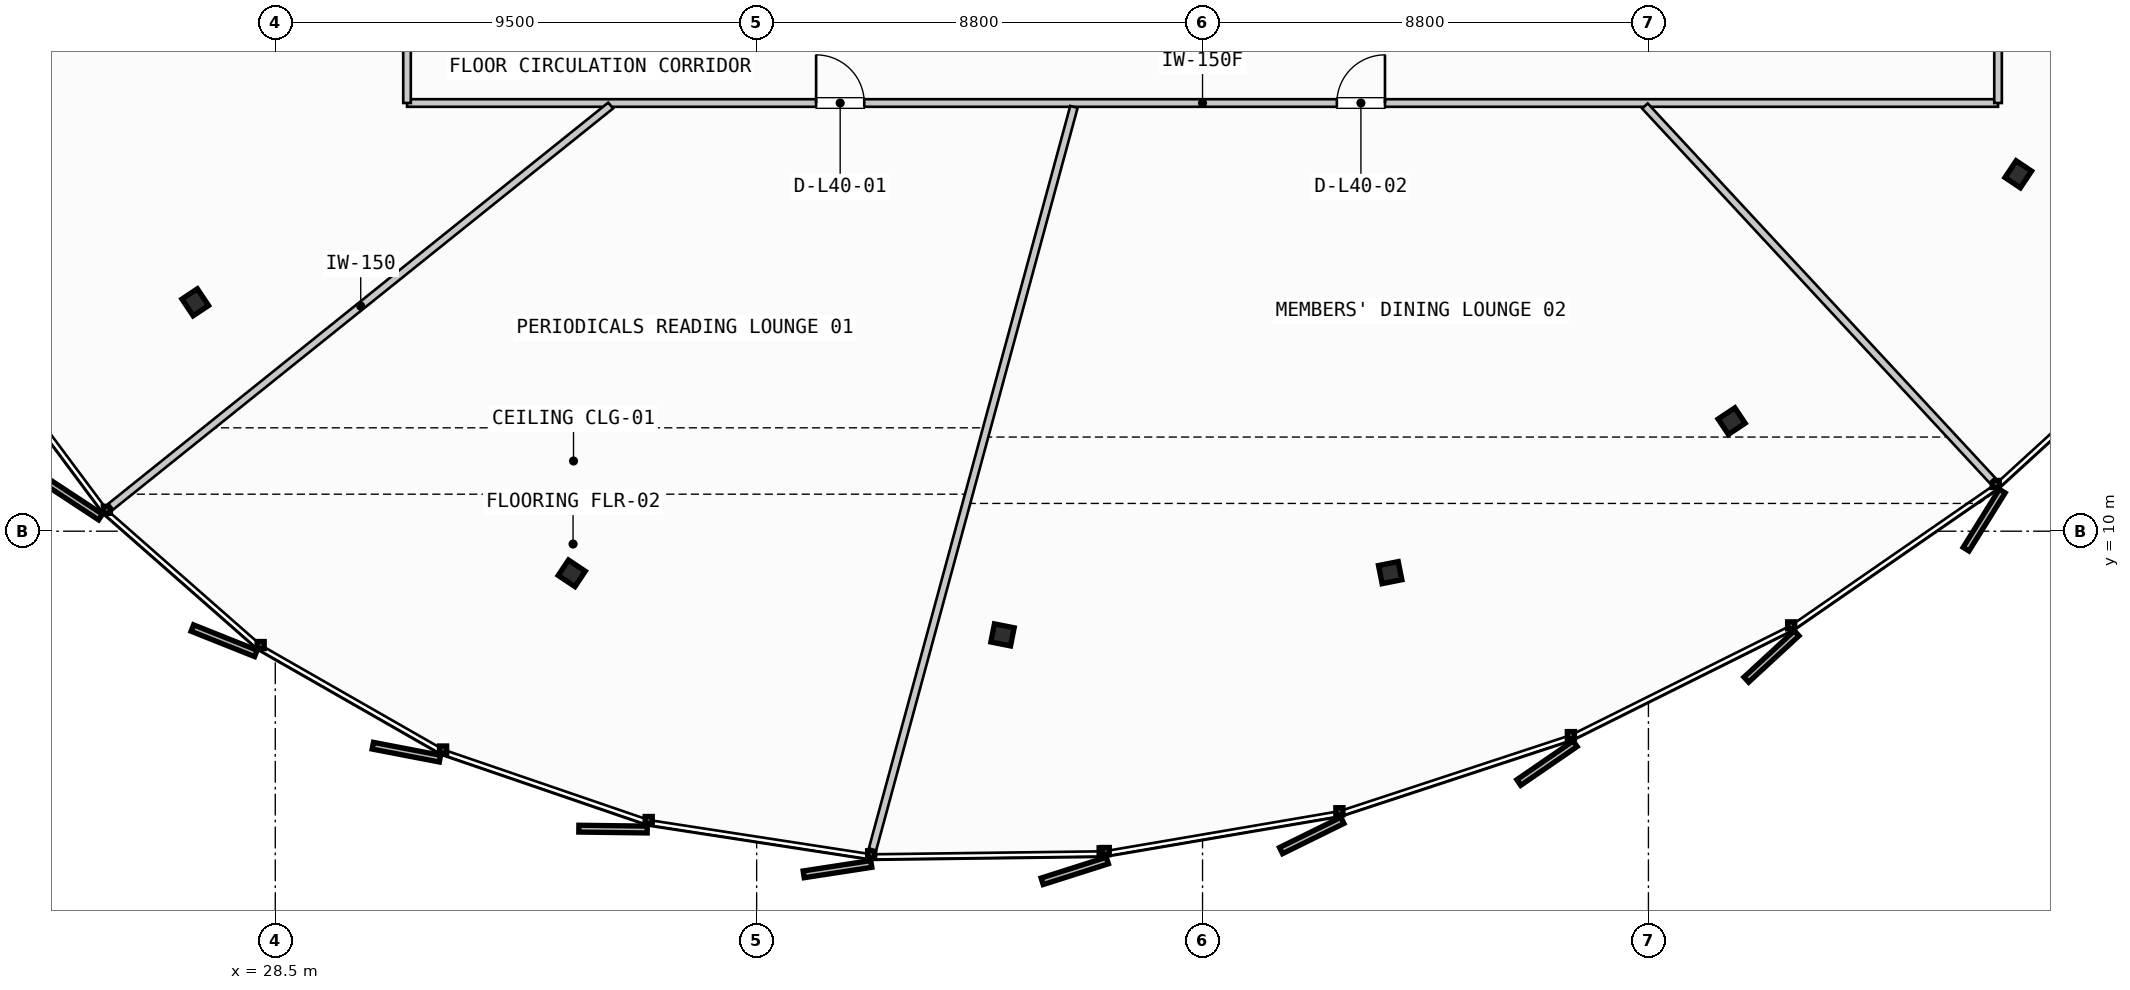
"""IFC4 building model, lengths in metres.
Left out: names, types, materials, properties, quantities, classifications, styles, units other than length and angle.
Written with IfcOpenShell. Run it as: python <this file> out.ifc"""

import sys

from ifc_helpers import new_model, si_unit, direction, frame, frame_2d, origin, origin_2d, place, context, subcontext, project, spatial, rectangle, i_section, extrude, source, transform, mapped, element, fill, save


model = new_model("IFC4")
c1 = context("Model", 3, precision=1e-05, world=origin(), true_north=direction((0.0, 1.0)))
c2 = subcontext(c1, "Body", "Model", "MODEL_VIEW")
j1 = project(units=[si_unit("LENGTHUNIT", "METRE"), si_unit("PLANEANGLEUNIT", "RADIAN")], contexts=[c1])
p1 = place(None, origin())
s1 = spatial("IfcSite", under=j1, at=p1, CompositionType="ELEMENT")
p2 = place(p1, origin())
s2 = spatial("IfcBuilding", under=s1, at=p2, CompositionType="ELEMENT")
p3 = place(p2, frame((0.0, 0.0, 157.2)))
s3 = spatial("IfcBuildingStorey", under=s2, at=p3, CompositionType="ELEMENT", Elevation=157.2)
m1 = source(origin(), c2, "Body", "SweptSolid", [
    extrude(i_section(OverallWidth=0.397, OverallDepth=0.365, WebThickness=0.028, FlangeThickness=0.044, FilletRadius=0.015, at=origin_2d()), origin(), (0.0, 0.0, 1.0), 3.3),
])
for number, where, z_axis, x_axis in (
    (1, (26.921, 14.517, 0.0), (0.0, 0.0, 1.0), (-0.831, -0.556, 0.0)),
    (2, (34.351, 9.168, 0.0), (0.0, 0.0, 1.0), (-0.556, -0.831, 0.0)),
    (3, (42.852, 7.954, 0.0), (0.0, 0.0, 1.0), (-0.195, -0.981, 0.0)),
    (4, (50.503, 9.182, 0.0), (0.0, 0.0, 1.0), (0.195, -0.981, 0.0)),
    (5, (57.242, 12.172, 0.0), (0.0, 0.0, 1.0), (0.556, -0.831, 0.0)),
    (6, (62.899, 17.043, 0.0), (0.0, 0.0, 1.0), (0.831, -0.556, 0.0)),
):
    element("IfcColumn", number, at=place(p3, frame(where, z_axis=z_axis, x_axis=x_axis)), inside=s3, PredefinedType="COLUMN", context=c2, shape_type="MappedRepresentation", body=[
        mapped(m1, transform((0.0, 0.0, 0.0), scale=1.0)),
    ])
p4 = place(p3, frame((31.1, 18.45, 0.0), z_axis=(0.0, 0.0, 1.0), x_axis=(1.0, 0.0, 0.0)))
e7 = element("IfcWall", 7, at=p4, inside=s3, PredefinedType="PARTITIONING", context=c2, shape_type="SweptSolid", body=[
    extrude(rectangle(XDim=31.4, YDim=0.15, at=frame_2d((15.7, 0.0))), origin(), (0.0, 0.0, 1.0), 2.28),
])
p5 = place(p4, frame((8.074, 0.0, 0.0)))
e8 = element("IfcOpeningElement", 8, at=p5, cuts=e7, PredefinedType="OPENING", context=c2, shape_type="SweptSolid", body=[
    extrude(rectangle(XDim=0.95, YDim=2.15, at=frame_2d((0.475, 1.075))), frame((0.0, 0.085, 0.0), z_axis=(0.0, -1.0, 0.0), x_axis=(1.0, 0.0, 0.0)), (0.0, 0.0, 1.0), 0.17),
])
p6 = place(p4, frame((18.351, 0.0, 0.0)))
e9 = element("IfcOpeningElement", 9, at=p6, cuts=e7, PredefinedType="OPENING", context=c2, shape_type="SweptSolid", body=[
    extrude(rectangle(XDim=0.95, YDim=2.15, at=frame_2d((0.475, 1.075))), frame((0.0, 0.085, 0.0), z_axis=(0.0, -1.0, 0.0), x_axis=(1.0, 0.0, 0.0)), (0.0, 0.0, 1.0), 0.17),
])
for number, where, z_axis, x_axis in (
    (10, (62.5, 18.45, 0.0), (0.0, 0.0, 1.0), (0.0, 1.0, 0.0)),
    (11, (31.1, 20.15, 0.0), (0.0, 0.0, 1.0), (0.0, -1.0, 0.0)),
):
    element("IfcWall", number, at=place(p3, frame(where, z_axis=z_axis, x_axis=x_axis)), inside=s3, PredefinedType="PARTITIONING", context=c2, shape_type="SweptSolid", body=[
        extrude(rectangle(XDim=1.7, YDim=0.15, at=frame_2d((0.85, 0.0))), origin(), (0.0, 0.0, 1.0), 2.28),
    ])
p7 = place(p3, frame((35.119, 18.4, 0.0), z_axis=(0.0, 0.0, 1.0), x_axis=(-0.779988558274, -0.625793775106, 0.0)))
e12 = element("IfcWall", 12, at=p7, inside=s3, PredefinedType="PARTITIONING", context=c2, shape_type="SweptSolid", body=[
    extrude(rectangle(XDim=12.648, YDim=0.15, at=frame_2d((6.324, 0.0))), origin(), (0.0, 0.0, 1.0), 2.28),
])
p8 = place(p3, frame((44.262, 18.373, 0.0), z_axis=(0.0, 0.0, 1.0), x_axis=(-0.261836804858, -0.965112163234, 0.0)))
e13 = element("IfcWall", 13, at=p8, inside=s3, PredefinedType="PARTITIONING", context=c2, shape_type="SweptSolid", body=[
    extrude(rectangle(XDim=15.183, YDim=0.15, at=frame_2d((7.591, 0.0))), origin(), (0.0, 0.0, 1.0), 2.28),
])
p9 = place(p3, frame((55.531, 18.391, 0.0), z_axis=(0.0, 0.0, 1.0), x_axis=(0.680268944675, -0.732962593119, 0.0)))
e14 = element("IfcWall", 14, at=p9, inside=s3, PredefinedType="PARTITIONING", context=c2, shape_type="SweptSolid", body=[
    extrude(rectangle(XDim=10.077, YDim=0.15, at=frame_2d((5.039, 0.0))), origin(), (0.0, 0.0, 1.0), 2.28),
])
m2 = source(origin(), c2, "Body", "SweptSolid", [
    extrude(rectangle(XDim=0.95, YDim=2.15, at=frame_2d((0.475, 1.075))), frame((0.0, 0.025, 0.0), z_axis=(0.0, -1.0, 0.0), x_axis=(1.0, 0.0, 0.0)), (0.0, 0.0, 1.0), 0.05),
])
p10 = place(p5, origin())
e15 = element("IfcDoor", 15, at=p10, inside=s3, OperationType="SINGLE_SWING_LEFT", PredefinedType="DOOR", context=c2, shape_type="MappedRepresentation", body=[
    mapped(m2, transform((0.0, 0.0, 0.0), scale=1.0)),
])
fill(e8, e15)
p11 = place(p6, origin())
e16 = element("IfcDoor", 16, at=p11, inside=s3, OperationType="SINGLE_SWING_RIGHT", PredefinedType="DOOR", context=c2, shape_type="MappedRepresentation", body=[
    mapped(m2, transform((0.0, 0.0, 0.0), scale=1.0)),
])
fill(e9, e16)
save(model, sys.argv[1])
